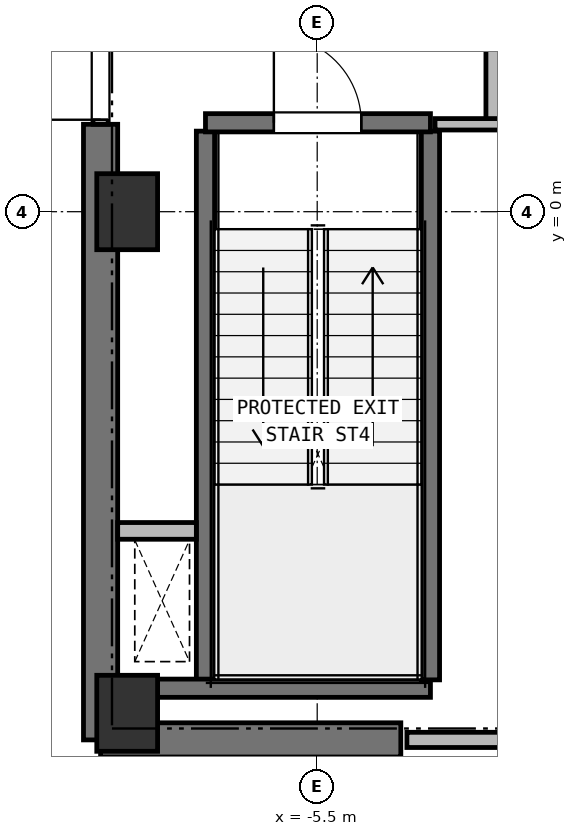
"""IFC4 building model, lengths in metres.
Left out: names, types, materials, properties, quantities, classifications, styles, units other than length and angle.
Written with IfcOpenShell. Run it as: python <this file> out.ifc"""

import sys

from ifc_helpers import new_model, si_unit, direction, frame, frame_2d, origin, origin_2d, place, context, subcontext, project, spatial, rectangle, extrude, element, fill, save


model = new_model("IFC4")
c1 = context("Model", 3, precision=1e-05, world=origin(), true_north=direction((0.0, 1.0)))
c2 = subcontext(c1, "Body", "Model", "MODEL_VIEW")
j1 = project(units=[si_unit("LENGTHUNIT", "METRE"), si_unit("PLANEANGLEUNIT", "RADIAN")], contexts=[c1])
p1 = place(None, origin())
s1 = spatial("IfcSite", under=j1, at=p1, CompositionType="ELEMENT")
p2 = place(p1, origin())
s2 = spatial("IfcBuilding", under=s1, at=p2, CompositionType="ELEMENT")
p3 = place(p2, frame((0.0, 0.0, 272.8)))
s3 = spatial("IfcBuildingStorey", under=s2, at=p3, CompositionType="ELEMENT", Elevation=272.8)
for number, where, z_axis, x_axis in (
    (1, (-8.0, -6.6, 0.0), (0.0, 0.0, 1.0), (1.0, 0.0, 0.0)),
    (2, (-8.0, 0.0, 0.0), (0.0, 0.0, 1.0), (1.0, 0.0, 0.0)),
):
    element("IfcColumn", number, at=place(p3, frame(where, z_axis=z_axis, x_axis=x_axis)), inside=s3, PredefinedType="COLUMN", context=c2, shape_type="SweptSolid", body=[
        extrude(rectangle(XDim=0.8, YDim=1.0, at=origin_2d()), origin(), (0.0, 0.0, 1.0), 4.4),
    ])
p4 = place(p3, frame((-8.35, -6.95, 0.0), z_axis=(0.0, 0.0, 1.0), x_axis=(1.0, 0.0, 0.0)))
e3 = element("IfcWall", 3, at=p4, inside=s3, PredefinedType="SHEAR", context=c2, shape_type="SweptSolid", body=[
    extrude(rectangle(XDim=3.95, YDim=0.45, at=frame_2d((1.975, 0.0))), origin(), (0.0, 0.0, 1.0), 4.15),
])
p5 = place(p3, frame((-8.35, -6.95, 0.0), z_axis=(0.0, 0.0, 1.0), x_axis=(0.0, 1.0, 0.0)))
e4 = element("IfcWall", 4, at=p5, inside=s3, PredefinedType="SHEAR", context=c2, shape_type="SweptSolid", body=[
    extrude(rectangle(XDim=8.1, YDim=0.45, at=frame_2d((4.05, 0.0))), origin(), (0.0, 0.0, 1.0), 4.15),
])
p6 = place(p3, frame((-6.97, -6.16, 0.0), z_axis=(0.0, 0.0, 1.0), x_axis=(0.0, 1.0, 0.0)))
e5 = element("IfcWall", 5, at=p6, inside=s3, PredefinedType="SHEAR", context=c2, shape_type="SweptSolid", body=[
    extrude(rectangle(XDim=7.22, YDim=0.24, at=frame_2d((3.61, 0.0))), origin(), (0.0, 0.0, 1.0), 4.15),
])
p7 = place(p3, frame((-7.6, -6.27, 0.0), z_axis=(0.0, 0.0, 1.0), x_axis=(1.0, 0.0, 0.0)))
e6 = element("IfcWall", 6, at=p7, inside=s3, PredefinedType="SHEAR", context=c2, shape_type="SweptSolid", body=[
    extrude(rectangle(XDim=3.59, YDim=0.24, at=frame_2d((1.795, 0.0))), origin(), (0.0, 0.0, 1.0), 4.15),
])
p8 = place(p3, frame((-4.01, -6.16, 0.0), z_axis=(0.0, 0.0, 1.0), x_axis=(0.0, 1.0, 0.0)))
e7 = element("IfcWall", 7, at=p8, inside=s3, PredefinedType="SHEAR", context=c2, shape_type="SweptSolid", body=[
    extrude(rectangle(XDim=7.22, YDim=0.24, at=frame_2d((3.61, 0.0))), origin(), (0.0, 0.0, 1.0), 4.15),
])
p9 = place(p3, frame((-6.97, 1.17, 0.0), z_axis=(0.0, 0.0, 1.0), x_axis=(1.0, 0.0, 0.0)))
e8 = element("IfcWall", 8, at=p9, inside=s3, PredefinedType="SHEAR", context=c2, shape_type="SweptSolid", body=[
    extrude(rectangle(XDim=2.96, YDim=0.24, at=frame_2d((1.48, 0.0))), origin(), (0.0, 0.0, 1.0), 4.15),
])
p10 = place(p9, frame((0.9, 0.0, 0.0)))
e9 = element("IfcOpeningElement", 9, at=p10, cuts=e8, PredefinedType="OPENING", context=c2, shape_type="SweptSolid", body=[
    extrude(rectangle(XDim=1.15, YDim=2.15, at=frame_2d((0.575, 1.075))), frame((0.0, 0.13, 0.0), z_axis=(0.0, -1.0, 0.0), x_axis=(1.0, 0.0, 0.0)), (0.0, 0.0, 1.0), 0.26),
])
p11 = place(p3, frame((-8.125, -4.2, 0.0), z_axis=(0.0, 0.0, 1.0), x_axis=(1.0, 0.0, 0.0)))
e10 = element("IfcWall", 10, at=p11, inside=s3, PredefinedType="PARTITIONING", context=c2, shape_type="SweptSolid", body=[
    extrude(rectangle(XDim=1.035, YDim=0.22, at=frame_2d((0.518, 0.0))), origin(), (0.0, 0.0, 1.0), 4.15),
])
p12 = place(p3, frame((-3.18, 1.15, 0.0), z_axis=(0.0, 0.0, 1.0), x_axis=(0.0, 1.0, 0.0)))
e11 = element("IfcWall", 11, at=p12, inside=s3, PredefinedType="PARTITIONING", context=c2, shape_type="SweptSolid", body=[
    extrude(rectangle(XDim=3.3, YDim=0.2, at=frame_2d((1.65, 0.0))), origin(), (0.0, 0.0, 1.0), 4.15),
])
p13 = place(p12, frame((1.08, 0.0, 0.0)))
e12 = element("IfcOpeningElement", 12, at=p13, cuts=e11, PredefinedType="OPENING", context=c2, shape_type="SweptSolid", body=[
    extrude(rectangle(XDim=1.15, YDim=2.15, at=frame_2d((0.575, 1.075))), frame((0.0, 0.11, 0.0), z_axis=(0.0, -1.0, 0.0), x_axis=(1.0, 0.0, 0.0)), (0.0, 0.0, 1.0), 0.22),
])
p14 = place(p3, frame((-8.35, 1.15, 0.0), z_axis=(0.0, 0.0, 1.0), x_axis=(0.0, 1.0, 0.0)))
e13 = element("IfcWall", 13, at=p14, inside=s3, PredefinedType="PARTITIONING", context=c2, shape_type="SweptSolid", body=[
    extrude(rectangle(XDim=5.4, YDim=0.2, at=frame_2d((2.7, 0.0))), origin(), (0.0, 0.0, 1.0), 4.15),
])
p15 = place(p14, frame((0.06, 0.0, 0.0)))
e14 = element("IfcOpeningElement", 14, at=p15, cuts=e13, PredefinedType="OPENING", context=c2, shape_type="SweptSolid", body=[
    extrude(rectangle(XDim=1.15, YDim=2.15, at=frame_2d((0.575, 1.075))), frame((0.0, 0.11, 0.0), z_axis=(0.0, -1.0, 0.0), x_axis=(1.0, 0.0, 0.0)), (0.0, 0.0, 1.0), 0.22),
])
p16 = place(p3, frame((3.95, 1.15, 0.0), z_axis=(0.0, 0.0, 1.0), x_axis=(-1.0, 0.0, 0.0)))
e15 = element("IfcWall", 15, at=p16, inside=s3, PredefinedType="PARTITIONING", context=c2, shape_type="SweptSolid", body=[
    extrude(rectangle(XDim=7.9, YDim=0.15, at=frame_2d((3.95, 0.0))), origin(), (0.0, 0.0, 1.0), 4.15),
])
p17 = place(p16, frame((3.49, 0.0, 0.0)))
e16 = element("IfcOpeningElement", 16, at=p17, cuts=e15, PredefinedType="OPENING", context=c2, shape_type="SweptSolid", body=[
    extrude(rectangle(XDim=0.92, YDim=2.05, at=frame_2d((0.46, 1.025))), frame((0.0, 0.085, 0.0), z_axis=(0.0, -1.0, 0.0), x_axis=(1.0, 0.0, 0.0)), (0.0, 0.0, 1.0), 0.17),
])
p18 = place(p3, frame((-4.32, -6.95, 0.0), z_axis=(0.0, 0.0, 1.0), x_axis=(1.0, 0.0, 0.0)))
e17 = element("IfcWall", 17, at=p18, inside=s3, PredefinedType="PARTITIONING", context=c2, shape_type="SweptSolid", body=[
    extrude(rectangle(XDim=8.64, YDim=0.2, at=frame_2d((4.32, 0.0))), origin(), (0.0, 0.0, 1.0), 4.15),
])
p19 = place(p10, origin())
e18 = element("IfcDoor", 18, at=p19, inside=s3, OperationType="SINGLE_SWING_LEFT", PredefinedType="DOOR", context=c2, shape_type="SweptSolid", body=[
    extrude(rectangle(XDim=1.15, YDim=2.15, at=frame_2d((0.575, 1.075))), frame((0.0, 0.025, 0.0), z_axis=(0.0, -1.0, 0.0), x_axis=(1.0, 0.0, 0.0)), (0.0, 0.0, 1.0), 0.05),
])
fill(e9, e18)
p20 = place(p15, origin())
e19 = element("IfcDoor", 19, at=p20, inside=s3, OperationType="SINGLE_SWING_LEFT", PredefinedType="DOOR", context=c2, shape_type="SweptSolid", body=[
    extrude(rectangle(XDim=1.15, YDim=2.15, at=frame_2d((0.575, 1.075))), frame((0.0, 0.025, 0.0), z_axis=(0.0, -1.0, 0.0), x_axis=(1.0, 0.0, 0.0)), (0.0, 0.0, 1.0), 0.05),
])
fill(e14, e19)
save(model, sys.argv[1])
